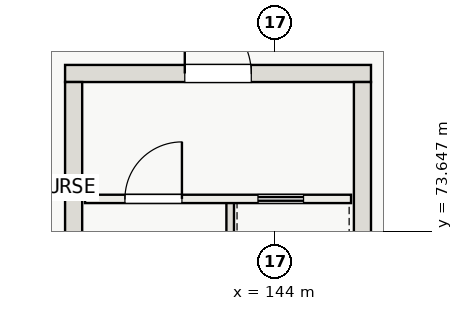
"""IFC4 building model, lengths in metres.
Left out: names, types, materials, properties, quantities, classifications, styles, units other than length and angle.
Written with IfcOpenShell. Run it as: python <this file> out.ifc"""

import sys

from ifc_helpers import new_model, si_unit, direction, frame, frame_2d, origin, place, context, subcontext, project, spatial, rectangle, extrude, element, fill, save


model = new_model("IFC4")
c1 = context("Model", 3, precision=1e-05, world=origin(), true_north=direction((0.0, 1.0)))
c2 = subcontext(c1, "Body", "Model", "MODEL_VIEW")
j1 = project(units=[si_unit("LENGTHUNIT", "METRE"), si_unit("PLANEANGLEUNIT", "RADIAN")], contexts=[c1])
p1 = place(None, origin())
s1 = spatial("IfcSite", under=j1, at=p1, CompositionType="ELEMENT")
p2 = place(p1, origin())
s2 = spatial("IfcBuilding", under=s1, at=p2, CompositionType="ELEMENT")
p3 = place(p2, frame((0.0, 0.0, 21.6)))
s3 = spatial("IfcBuildingStorey", under=s2, at=p3, CompositionType="ELEMENT", Elevation=21.6)
p4 = place(p3, frame((138.475, 77.8, 0.0), z_axis=(0.0, 0.0, 1.0), x_axis=(1.0, 0.0, 0.0)))
e1 = element("IfcWall", 1, at=p4, inside=s3, PredefinedType="SHEAR", context=c2, shape_type="SweptSolid", body=[
    extrude(rectangle(XDim=8.05, YDim=0.45, at=frame_2d((4.025, 0.0))), origin(), (0.0, 0.0, 1.0), 4.8),
])
p5 = place(p4, frame((3.15, 0.0, 0.0)))
e2 = element("IfcOpeningElement", 2, at=p5, cuts=e1, PredefinedType="OPENING", context=c2, shape_type="SweptSolid", body=[
    extrude(rectangle(XDim=1.75, YDim=2.3, at=frame_2d((0.875, 1.15))), frame((0.0, 0.235, 0.0), z_axis=(0.0, -1.0, 0.0), x_axis=(1.0, 0.0, 0.0)), (0.0, 0.0, 1.0), 0.47),
])
for number, where, z_axis, x_axis in (
    (3, (138.7, 66.425, 0.0), (0.0, 0.0, 1.0), (0.0, 1.0, 0.0)),
    (4, (146.3, 66.425, 0.0), (0.0, 0.0, 1.0), (0.0, 1.0, 0.0)),
):
    element("IfcWall", number, at=place(p3, frame(where, z_axis=z_axis, x_axis=x_axis)), inside=s3, PredefinedType="SHEAR", context=c2, shape_type="SweptSolid", body=[
        extrude(rectangle(XDim=11.15, YDim=0.45, at=frame_2d((5.575, 0.0))), origin(), (0.0, 0.0, 1.0), 4.8),
    ])
p6 = place(p3, frame((142.82, 66.45, 0.0), z_axis=(0.0, 0.0, 1.0), x_axis=(0.0, 1.0, 0.0)))
e5 = element("IfcWall", 5, at=p6, inside=s3, PredefinedType="SOLIDWALL", context=c2, shape_type="SweptSolid", body=[
    extrude(rectangle(XDim=8.0, YDim=0.2, at=frame_2d((4.0, 0.0))), origin(), (0.0, 0.0, 1.0), 4.8),
])
p7 = place(p3, frame((139.0, 74.5, 0.0), z_axis=(0.0, 0.0, 1.0), x_axis=(1.0, 0.0, 0.0)))
e6 = element("IfcWall", 6, at=p7, inside=s3, PredefinedType="SOLIDWALL", context=c2, shape_type="SweptSolid", body=[
    extrude(rectangle(XDim=7.0, YDim=0.22, at=frame_2d((3.5, 0.0))), origin(), (0.0, 0.0, 1.0), 4.53),
])
p8 = place(p7, frame((1.05, 0.0, 0.0)))
e7 = element("IfcOpeningElement", 7, at=p8, cuts=e6, PredefinedType="OPENING", context=c2, shape_type="SweptSolid", body=[
    extrude(rectangle(XDim=1.5, YDim=2.2, at=frame_2d((0.75, 1.1))), frame((0.0, 0.12, 0.0), z_axis=(0.0, -1.0, 0.0), x_axis=(1.0, 0.0, 0.0)), (0.0, 0.0, 1.0), 0.24),
])
p9 = place(p7, frame((4.55, 0.0, 0.0)))
e8 = element("IfcOpeningElement", 8, at=p9, cuts=e6, PredefinedType="OPENING", context=c2, shape_type="SweptSolid", body=[
    extrude(rectangle(XDim=1.2, YDim=2.2, at=frame_2d((0.6, 1.1))), frame((0.0, 0.12, 0.0), z_axis=(0.0, -1.0, 0.0), x_axis=(1.0, 0.0, 0.0)), (0.0, 0.0, 1.0), 0.24),
])
p10 = place(p8, origin())
e9 = element("IfcDoor", 9, at=p10, inside=s3, OperationType="SINGLE_SWING_RIGHT", PredefinedType="DOOR", context=c2, shape_type="SweptSolid", body=[
    extrude(rectangle(XDim=1.5, YDim=2.2, at=frame_2d((0.75, 1.1))), frame((0.0, 0.025, 0.0), z_axis=(0.0, -1.0, 0.0), x_axis=(1.0, 0.0, 0.0)), (0.0, 0.0, 1.0), 0.05),
])
fill(e7, e9)
p11 = place(p9, origin())
e10 = element("IfcDoor", 10, at=p11, inside=s3, OperationType="SLIDING_TO_RIGHT", PredefinedType="DOOR", context=c2, shape_type="SweptSolid", body=[
    extrude(rectangle(XDim=1.2, YDim=2.2, at=frame_2d((0.6, 1.1))), frame((0.0, 0.025, 0.0), z_axis=(0.0, -1.0, 0.0), x_axis=(1.0, 0.0, 0.0)), (0.0, 0.0, 1.0), 0.05),
])
fill(e8, e10)
p12 = place(p5, frame((1.75, 0.0, 0.0), z_axis=(0.0, 0.0, 1.0), x_axis=(-1.0, 0.0, 0.0)))
e11 = element("IfcDoor", 11, at=p12, inside=s3, OperationType="DOUBLE_DOOR_SINGLE_SWING", PredefinedType="DOOR", context=c2, shape_type="SweptSolid", body=[
    extrude(rectangle(XDim=1.75, YDim=2.3, at=frame_2d((0.875, 1.15))), frame((0.0, 0.025, 0.0), z_axis=(0.0, -1.0, 0.0), x_axis=(1.0, 0.0, 0.0)), (0.0, 0.0, 1.0), 0.05),
])
fill(e2, e11)
save(model, sys.argv[1])
